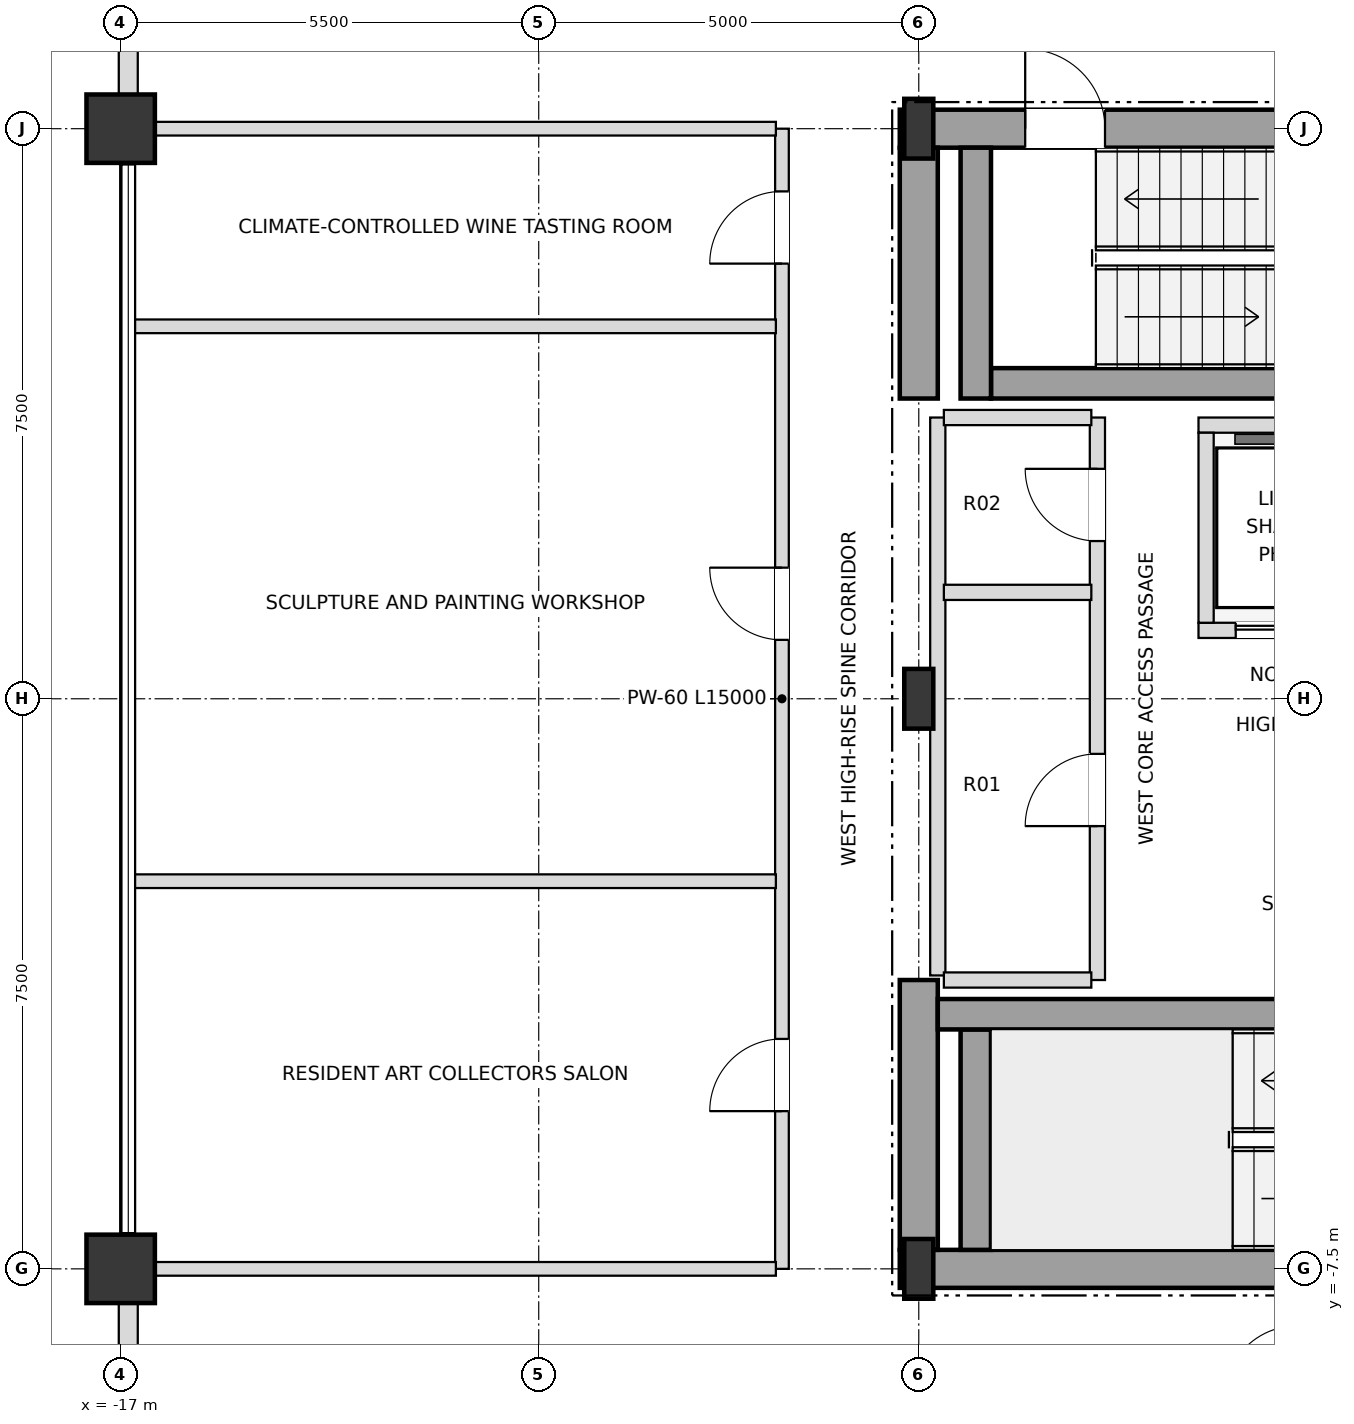
"""IFC4 building model, lengths in metres.
Left out: names, types, materials, properties, quantities, classifications, styles, units other than length and angle.
Written with IfcOpenShell. Run it as: python <this file> out.ifc"""

import sys

from ifc_helpers import new_model, si_unit, direction, frame, frame_2d, origin, origin_2d, place, context, subcontext, project, spatial, rectangle, i_section, extrude, element, fill, save


model = new_model("IFC4")
c1 = context("Model", 3, precision=1e-05, world=origin(), true_north=direction((0.0, 1.0)))
c2 = subcontext(c1, "Body", "Model", "MODEL_VIEW")
j1 = project(units=[si_unit("LENGTHUNIT", "METRE"), si_unit("PLANEANGLEUNIT", "RADIAN")], contexts=[c1])
p1 = place(None, origin())
s1 = spatial("IfcSite", under=j1, at=p1, CompositionType="ELEMENT")
p2 = place(p1, origin())
s2 = spatial("IfcBuilding", under=s1, at=p2, CompositionType="ELEMENT")
p3 = place(p2, frame((0.0, 0.0, 233.1)))
s3 = spatial("IfcBuildingStorey", under=s2, at=p3, CompositionType="ELEMENT", Elevation=233.1)
for number, where, z_axis, x_axis in (
    (1, (-6.5, -7.5, 0.0), (0.0, 0.0, 1.0), (1.0, 0.0, 0.0)),
    (2, (-6.5, 0.0, 0.0), (0.0, 0.0, 1.0), (1.0, 0.0, 0.0)),
    (3, (-6.5, 7.5, 0.0), (0.0, 0.0, 1.0), (1.0, 0.0, 0.0)),
):
    element("IfcColumn", number, at=place(p3, frame(where, z_axis=z_axis, x_axis=x_axis)), inside=s3, PredefinedType="COLUMN", context=c2, shape_type="SweptSolid", body=[
        extrude(i_section(OverallWidth=0.382, OverallDepth=0.786, WebThickness=0.02, FlangeThickness=0.033, at=origin_2d()), origin(), (0.0, 0.0, 1.0), 3.6),
    ])
for number, where, z_axis, x_axis in (
    (4, (-17.0, 7.5, 0.0), (0.0, 0.0, 1.0), (1.0, 0.0, 0.0)),
    (5, (-17.0, -7.5, 0.0), (0.0, 0.0, 1.0), (1.0, 0.0, 0.0)),
):
    element("IfcColumn", number, at=place(p3, frame(where, z_axis=z_axis, x_axis=x_axis)), inside=s3, PredefinedType="USERDEFINED", context=c2, shape_type="SweptSolid", body=[
        extrude(rectangle(XDim=0.9, YDim=0.9, at=origin_2d()), origin(), (0.0, 0.0, 1.0), 3.6),
    ])
p4 = place(p3, frame((-16.9, 12.555, 0.0), z_axis=(0.0, 0.0, 1.0), x_axis=(0.0, -1.0, 0.0)))
e6 = element("IfcWall", 6, at=p4, inside=s3, PredefinedType="SOLIDWALL", context=c2, shape_type="SweptSolid", body=[
    extrude(rectangle(XDim=4.61, YDim=0.25, at=frame_2d((2.305, 0.0))), origin(), (0.0, 0.0, 1.0), 2.748),
])
p5 = place(p4, frame((1.405, 0.0, 0.72)))
e7 = element("IfcOpeningElement", 7, at=p5, cuts=e6, PredefinedType="OPENING", context=c2, shape_type="SweptSolid", body=[
    extrude(rectangle(XDim=1.8, YDim=1.68, at=frame_2d((0.9, 0.84))), frame((0.0, 0.135, 0.0), z_axis=(0.0, -1.0, 0.0), x_axis=(1.0, 0.0, 0.0)), (0.0, 0.0, 1.0), 0.27),
])
p6 = place(p3, frame((-16.9, -7.945, 0.0), z_axis=(0.0, 0.0, 1.0), x_axis=(0.0, -1.0, 0.0)))
e8 = element("IfcWall", 8, at=p6, inside=s3, PredefinedType="SOLIDWALL", context=c2, shape_type="SweptSolid", body=[
    extrude(rectangle(XDim=4.61, YDim=0.25, at=frame_2d((2.305, 0.0))), origin(), (0.0, 0.0, 1.0), 2.748),
])
p7 = place(p6, frame((1.405, 0.0, 0.72)))
e9 = element("IfcOpeningElement", 9, at=p7, cuts=e8, PredefinedType="OPENING", context=c2, shape_type="SweptSolid", body=[
    extrude(rectangle(XDim=1.8, YDim=1.68, at=frame_2d((0.9, 0.84))), frame((0.0, 0.135, 0.0), z_axis=(0.0, -1.0, 0.0), x_axis=(1.0, 0.0, 0.0)), (0.0, 0.0, 1.0), 0.27),
])
p8 = place(p3, frame((-6.75, -7.5, 0.0), z_axis=(0.0, 0.0, 1.0), x_axis=(1.0, 0.0, 0.0)))
e10 = element("IfcWall", 10, at=p8, inside=s3, PredefinedType="SHEAR", context=c2, shape_type="SweptSolid", body=[
    extrude(rectangle(XDim=6.75, YDim=0.5, at=frame_2d((3.375, 0.0))), origin(), (0.0, 0.0, 1.0), 3.38),
])
p9 = place(p3, frame((-6.75, 7.5, 0.0), z_axis=(0.0, 0.0, 1.0), x_axis=(1.0, 0.0, 0.0)))
e11 = element("IfcWall", 11, at=p9, inside=s3, PredefinedType="SHEAR", context=c2, shape_type="SweptSolid", body=[
    extrude(rectangle(XDim=6.75, YDim=0.5, at=frame_2d((3.375, 0.0))), origin(), (0.0, 0.0, 1.0), 3.38),
])
p10 = place(p9, frame((1.65, 0.0, 0.0)))
e12 = element("IfcOpeningElement", 12, at=p10, cuts=e11, PredefinedType="OPENING", context=c2, shape_type="SweptSolid", body=[
    extrude(rectangle(XDim=1.05, YDim=2.15, at=frame_2d((0.525, 1.075))), frame((0.0, 0.26, 0.0), z_axis=(0.0, -1.0, 0.0), x_axis=(1.0, 0.0, 0.0)), (0.0, 0.0, 1.0), 0.52),
])
p11 = place(p3, frame((-6.5, -7.25, 0.0), z_axis=(0.0, 0.0, 1.0), x_axis=(0.0, 1.0, 0.0)))
e13 = element("IfcWall", 13, at=p11, inside=s3, PredefinedType="SHEAR", context=c2, shape_type="SweptSolid", body=[
    extrude(rectangle(XDim=3.55, YDim=0.5, at=frame_2d((1.775, 0.0))), origin(), (0.0, 0.0, 1.0), 3.38),
])
p12 = place(p3, frame((-6.5, 3.95, 0.0), z_axis=(0.0, 0.0, 1.0), x_axis=(0.0, 1.0, 0.0)))
e14 = element("IfcWall", 14, at=p12, inside=s3, PredefinedType="SHEAR", context=c2, shape_type="SweptSolid", body=[
    extrude(rectangle(XDim=3.3, YDim=0.5, at=frame_2d((1.65, 0.0))), origin(), (0.0, 0.0, 1.0), 3.38),
])
p13 = place(p3, frame((-5.75, -7.25, 0.0), z_axis=(0.0, 0.0, 1.0), x_axis=(0.0, 1.0, 0.0)))
e15 = element("IfcWall", 15, at=p13, inside=s3, PredefinedType="SHEAR", context=c2, shape_type="SweptSolid", body=[
    extrude(rectangle(XDim=2.9, YDim=0.4, at=frame_2d((1.45, 0.0))), origin(), (0.0, 0.0, 1.0), 3.38),
])
p14 = place(p3, frame((-6.25, -4.15, 0.0), z_axis=(0.0, 0.0, 1.0), x_axis=(1.0, 0.0, 0.0)))
e16 = element("IfcWall", 16, at=p14, inside=s3, PredefinedType="SHEAR", context=c2, shape_type="SweptSolid", body=[
    extrude(rectangle(XDim=7.78, YDim=0.4, at=frame_2d((3.89, 0.0))), origin(), (0.0, 0.0, 1.0), 3.38),
])
p15 = place(p3, frame((-5.55, 4.15, 0.0), z_axis=(0.0, 0.0, 1.0), x_axis=(1.0, 0.0, 0.0)))
e17 = element("IfcWall", 17, at=p15, inside=s3, PredefinedType="SHEAR", context=c2, shape_type="SweptSolid", body=[
    extrude(rectangle(XDim=7.08, YDim=0.4, at=frame_2d((3.54, 0.0))), origin(), (0.0, 0.0, 1.0), 3.38),
])
p16 = place(p3, frame((-5.75, 3.95, 0.0), z_axis=(0.0, 0.0, 1.0), x_axis=(0.0, 1.0, 0.0)))
e18 = element("IfcWall", 18, at=p16, inside=s3, PredefinedType="SHEAR", context=c2, shape_type="SweptSolid", body=[
    extrude(rectangle(XDim=3.3, YDim=0.4, at=frame_2d((1.65, 0.0))), origin(), (0.0, 0.0, 1.0), 3.38),
])
p17 = place(p3, frame((-2.82, 0.9, 0.0), z_axis=(0.0, 0.0, 1.0), x_axis=(1.0, 0.0, 0.0)))
e19 = element("IfcWall", 19, at=p17, inside=s3, PredefinedType="SOLIDWALL", context=c2, shape_type="SweptSolid", body=[
    extrude(rectangle(XDim=5.58, YDim=0.2, at=frame_2d((2.79, 0.0))), origin(), (0.0, 0.0, 1.0), 3.38),
])
p18 = place(p17, frame((0.49, 0.0, 0.0)))
e20 = element("IfcOpeningElement", 20, at=p18, cuts=e19, PredefinedType="OPENING", context=c2, shape_type="SweptSolid", body=[
    extrude(rectangle(XDim=1.1, YDim=2.15, at=frame_2d((0.55, 1.075))), frame((0.0, 0.11, 0.0), z_axis=(0.0, -1.0, 0.0), x_axis=(1.0, 0.0, 0.0)), (0.0, 0.0, 1.0), 0.22),
])
p19 = place(p17, frame((2.17, 0.0, 0.0)))
e21 = element("IfcOpeningElement", 21, at=p19, cuts=e19, PredefinedType="OPENING", context=c2, shape_type="SweptSolid", body=[
    extrude(rectangle(XDim=1.1, YDim=2.15, at=frame_2d((0.55, 1.075))), frame((0.0, 0.11, 0.0), z_axis=(0.0, -1.0, 0.0), x_axis=(1.0, 0.0, 0.0)), (0.0, 0.0, 1.0), 0.22),
])
p20 = place(p17, frame((3.86, 0.0, 0.0)))
e22 = element("IfcOpeningElement", 22, at=p20, cuts=e19, PredefinedType="OPENING", context=c2, shape_type="SweptSolid", body=[
    extrude(rectangle(XDim=1.2, YDim=2.2, at=frame_2d((0.6, 1.1))), frame((0.0, 0.11, 0.0), z_axis=(0.0, -1.0, 0.0), x_axis=(1.0, 0.0, 0.0)), (0.0, 0.0, 1.0), 0.22),
])
p21 = place(p3, frame((-2.82, 3.6, 0.0), z_axis=(0.0, 0.0, 1.0), x_axis=(1.0, 0.0, 0.0)))
e23 = element("IfcWall", 23, at=p21, inside=s3, PredefinedType="SOLIDWALL", context=c2, shape_type="SweptSolid", body=[
    extrude(rectangle(XDim=5.58, YDim=0.2, at=frame_2d((2.79, 0.0))), origin(), (0.0, 0.0, 1.0), 3.38),
])
p22 = place(p3, frame((-2.72, 1.0, 0.0), z_axis=(0.0, 0.0, 1.0), x_axis=(0.0, 1.0, 0.0)))
e24 = element("IfcWall", 24, at=p22, inside=s3, PredefinedType="SOLIDWALL", context=c2, shape_type="SweptSolid", body=[
    extrude(rectangle(XDim=2.5, YDim=0.2, at=frame_2d((1.25, 0.0))), origin(), (0.0, 0.0, 1.0), 3.38),
])
p23 = place(p3, frame((-8.3, -7.5, 0.0), z_axis=(0.0, 0.0, 1.0), x_axis=(0.0, 1.0, 0.0)))
e25 = element("IfcWall", 25, at=p23, inside=s3, PredefinedType="PARTITIONING", context=c2, shape_type="SweptSolid", body=[
    extrude(rectangle(XDim=15.0, YDim=0.18, at=frame_2d((7.5, 0.0))), origin(), (0.0, 0.0, 1.0), 3.38),
])
p24 = place(p23, frame((2.075, 0.0, 0.0)))
e26 = element("IfcOpeningElement", 26, at=p24, cuts=e25, PredefinedType="OPENING", context=c2, shape_type="SweptSolid", body=[
    extrude(rectangle(XDim=0.95, YDim=2.15, at=frame_2d((0.475, 1.075))), frame((0.0, 0.1, 0.0), z_axis=(0.0, -1.0, 0.0), x_axis=(1.0, 0.0, 0.0)), (0.0, 0.0, 1.0), 0.2),
])
p25 = place(p23, frame((8.275, 0.0, 0.0)))
e27 = element("IfcOpeningElement", 27, at=p25, cuts=e25, PredefinedType="OPENING", context=c2, shape_type="SweptSolid", body=[
    extrude(rectangle(XDim=0.95, YDim=2.15, at=frame_2d((0.475, 1.075))), frame((0.0, 0.1, 0.0), z_axis=(0.0, -1.0, 0.0), x_axis=(1.0, 0.0, 0.0)), (0.0, 0.0, 1.0), 0.2),
])
p26 = place(p23, frame((13.225, 0.0, 0.0)))
e28 = element("IfcOpeningElement", 28, at=p26, cuts=e25, PredefinedType="OPENING", context=c2, shape_type="SweptSolid", body=[
    extrude(rectangle(XDim=0.95, YDim=2.15, at=frame_2d((0.475, 1.075))), frame((0.0, 0.1, 0.0), z_axis=(0.0, -1.0, 0.0), x_axis=(1.0, 0.0, 0.0)), (0.0, 0.0, 1.0), 0.2),
])
p27 = place(p3, frame((-6.25, -3.64, 0.0), z_axis=(0.0, 0.0, 1.0), x_axis=(0.0, 1.0, 0.0)))
e29 = element("IfcWall", 29, at=p27, inside=s3, PredefinedType="SOLIDWALL", context=c2, shape_type="SweptSolid", body=[
    extrude(rectangle(XDim=7.34, YDim=0.2, at=frame_2d((3.67, 0.0))), origin(), (0.0, 0.0, 1.0), 3.38),
])
p28 = place(p3, frame((-4.15, -3.7, 0.0), z_axis=(0.0, 0.0, 1.0), x_axis=(0.0, 1.0, 0.0)))
e30 = element("IfcWall", 30, at=p28, inside=s3, PredefinedType="SOLIDWALL", context=c2, shape_type="SweptSolid", body=[
    extrude(rectangle(XDim=7.4, YDim=0.2, at=frame_2d((3.7, 0.0))), origin(), (0.0, 0.0, 1.0), 3.38),
])
p29 = place(p28, frame((2.025, 0.0, 0.0)))
e31 = element("IfcOpeningElement", 31, at=p29, cuts=e30, PredefinedType="OPENING", context=c2, shape_type="SweptSolid", body=[
    extrude(rectangle(XDim=0.95, YDim=2.15, at=frame_2d((0.475, 1.075))), frame((0.0, 0.11, 0.0), z_axis=(0.0, -1.0, 0.0), x_axis=(1.0, 0.0, 0.0)), (0.0, 0.0, 1.0), 0.22),
])
p30 = place(p28, frame((5.775, 0.0, 0.0)))
e32 = element("IfcOpeningElement", 32, at=p30, cuts=e30, PredefinedType="OPENING", context=c2, shape_type="SweptSolid", body=[
    extrude(rectangle(XDim=0.95, YDim=2.15, at=frame_2d((0.475, 1.075))), frame((0.0, 0.11, 0.0), z_axis=(0.0, -1.0, 0.0), x_axis=(1.0, 0.0, 0.0)), (0.0, 0.0, 1.0), 0.22),
])
p31 = place(p3, frame((-16.9, -7.5, 0.0), z_axis=(0.0, 0.0, 1.0), x_axis=(1.0, 0.0, 0.0)))
e33 = element("IfcWall", 33, at=p31, inside=s3, PredefinedType="PARTITIONING", context=c2, shape_type="SweptSolid", body=[
    extrude(rectangle(XDim=8.52, YDim=0.18, at=frame_2d((4.26, 0.0))), origin(), (0.0, 0.0, 1.0), 2.826),
])
p32 = place(p3, frame((-6.17, -3.7, 0.0), z_axis=(0.0, 0.0, 1.0), x_axis=(1.0, 0.0, 0.0)))
e34 = element("IfcWall", 34, at=p32, inside=s3, PredefinedType="SOLIDWALL", context=c2, shape_type="SweptSolid", body=[
    extrude(rectangle(XDim=1.94, YDim=0.2, at=frame_2d((0.97, 0.0))), origin(), (0.0, 0.0, 1.0), 3.38),
])
p33 = place(p3, frame((-16.82, -2.4, 0.0), z_axis=(0.0, 0.0, 1.0), x_axis=(1.0, 0.0, 0.0)))
e35 = element("IfcWall", 35, at=p33, inside=s3, PredefinedType="PARTITIONING", context=c2, shape_type="SweptSolid", body=[
    extrude(rectangle(XDim=8.44, YDim=0.18, at=frame_2d((4.22, 0.0))), origin(), (0.0, 0.0, 1.0), 3.018),
])
for number, where, z_axis, x_axis in (
    (36, (-6.17, 1.4, 0.0), (0.0, 0.0, 1.0), (1.0, 0.0, 0.0)),
    (37, (-6.17, 3.7, 0.0), (0.0, 0.0, 1.0), (1.0, 0.0, 0.0)),
):
    element("IfcWall", number, at=place(p3, frame(where, z_axis=z_axis, x_axis=x_axis)), inside=s3, PredefinedType="SOLIDWALL", context=c2, shape_type="SweptSolid", body=[
        extrude(rectangle(XDim=1.94, YDim=0.2, at=frame_2d((0.97, 0.0))), origin(), (0.0, 0.0, 1.0), 3.38),
    ])
p34 = place(p3, frame((-16.82, 4.9, 0.0), z_axis=(0.0, 0.0, 1.0), x_axis=(1.0, 0.0, 0.0)))
e38 = element("IfcWall", 38, at=p34, inside=s3, PredefinedType="PARTITIONING", context=c2, shape_type="SweptSolid", body=[
    extrude(rectangle(XDim=8.44, YDim=0.18, at=frame_2d((4.22, 0.0))), origin(), (0.0, 0.0, 1.0), 3.018),
])
p35 = place(p3, frame((-16.9, 7.5, 0.0), z_axis=(0.0, 0.0, 1.0), x_axis=(1.0, 0.0, 0.0)))
e39 = element("IfcWall", 39, at=p35, inside=s3, PredefinedType="PARTITIONING", context=c2, shape_type="SweptSolid", body=[
    extrude(rectangle(XDim=8.52, YDim=0.18, at=frame_2d((4.26, 0.0))), origin(), (0.0, 0.0, 1.0), 2.826),
])
p36 = place(p10, origin())
e40 = element("IfcDoor", 40, at=p36, inside=s3, OperationType="SINGLE_SWING_LEFT", PredefinedType="DOOR", context=c2, shape_type="SweptSolid", body=[
    extrude(rectangle(XDim=1.05, YDim=2.15, at=frame_2d((0.525, 1.075))), frame((0.0, 0.025, 0.0), z_axis=(0.0, -1.0, 0.0), x_axis=(1.0, 0.0, 0.0)), (0.0, 0.0, 1.0), 0.05),
])
fill(e12, e40)
p37 = place(p18, origin())
e41 = element("IfcDoor", 41, at=p37, inside=s3, OperationType="DOUBLE_DOOR_SLIDING", PredefinedType="DOOR", context=c2, shape_type="SweptSolid", body=[
    extrude(rectangle(XDim=1.1, YDim=2.15, at=frame_2d((0.55, 1.075))), frame((0.0, 0.025, 0.0), z_axis=(0.0, -1.0, 0.0), x_axis=(1.0, 0.0, 0.0)), (0.0, 0.0, 1.0), 0.05),
])
fill(e20, e41)
p38 = place(p29, origin())
e42 = element("IfcDoor", 42, at=p38, inside=s3, OperationType="SINGLE_SWING_LEFT", PredefinedType="DOOR", context=c2, shape_type="SweptSolid", body=[
    extrude(rectangle(XDim=0.95, YDim=2.15, at=frame_2d((0.475, 1.075))), frame((0.0, 0.025, 0.0), z_axis=(0.0, -1.0, 0.0), x_axis=(1.0, 0.0, 0.0)), (0.0, 0.0, 1.0), 0.05),
])
fill(e31, e42)
p39 = place(p30, origin())
e43 = element("IfcDoor", 43, at=p39, inside=s3, OperationType="SINGLE_SWING_RIGHT", PredefinedType="DOOR", context=c2, shape_type="SweptSolid", body=[
    extrude(rectangle(XDim=0.95, YDim=2.15, at=frame_2d((0.475, 1.075))), frame((0.0, 0.025, 0.0), z_axis=(0.0, -1.0, 0.0), x_axis=(1.0, 0.0, 0.0)), (0.0, 0.0, 1.0), 0.05),
])
fill(e32, e43)
p40 = place(p24, origin())
e44 = element("IfcDoor", 44, at=p40, inside=s3, OperationType="SINGLE_SWING_LEFT", PredefinedType="DOOR", context=c2, shape_type="SweptSolid", body=[
    extrude(rectangle(XDim=0.95, YDim=2.15, at=frame_2d((0.475, 1.075))), frame((0.0, 0.025, 0.0), z_axis=(0.0, -1.0, 0.0), x_axis=(1.0, 0.0, 0.0)), (0.0, 0.0, 1.0), 0.05),
])
fill(e26, e44)
p41 = place(p25, origin())
e45 = element("IfcDoor", 45, at=p41, inside=s3, OperationType="SINGLE_SWING_RIGHT", PredefinedType="DOOR", context=c2, shape_type="SweptSolid", body=[
    extrude(rectangle(XDim=0.95, YDim=2.15, at=frame_2d((0.475, 1.075))), frame((0.0, 0.025, 0.0), z_axis=(0.0, -1.0, 0.0), x_axis=(1.0, 0.0, 0.0)), (0.0, 0.0, 1.0), 0.05),
])
fill(e27, e45)
p42 = place(p26, origin())
e46 = element("IfcDoor", 46, at=p42, inside=s3, OperationType="SINGLE_SWING_LEFT", PredefinedType="DOOR", context=c2, shape_type="SweptSolid", body=[
    extrude(rectangle(XDim=0.95, YDim=2.15, at=frame_2d((0.475, 1.075))), frame((0.0, 0.025, 0.0), z_axis=(0.0, -1.0, 0.0), x_axis=(1.0, 0.0, 0.0)), (0.0, 0.0, 1.0), 0.05),
])
fill(e28, e46)
save(model, sys.argv[1])
